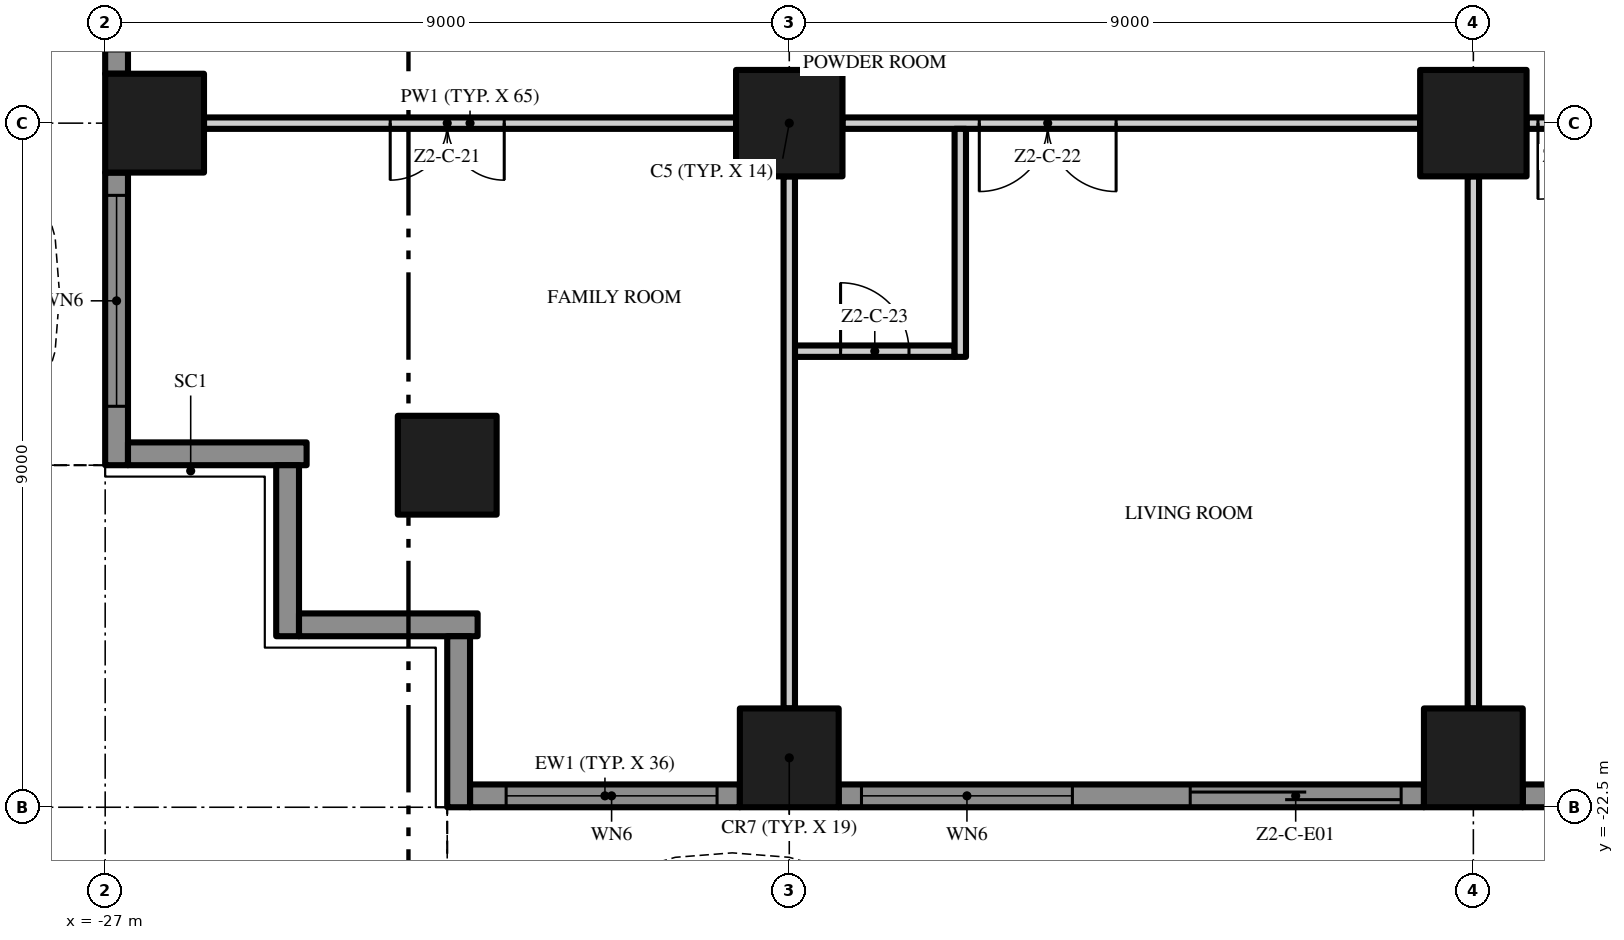
"""IFC4 building model, lengths in metres.
Left out: names, types, materials, properties, quantities, classifications, styles, units other than length and angle.
Written with IfcOpenShell. Run it as: python <this file> out.ifc"""

import sys

from ifc_helpers import new_model, si_unit, direction, frame, frame_2d, origin, origin_2d, place, context, subcontext, project, spatial, polyline, rectangle, outline, extrude, element, fill, save


model = new_model("IFC4")
c1 = context("Model", 3, precision=1e-05, world=origin(), true_north=direction((0.0, 1.0)))
c2 = subcontext(c1, "Body", "Model", "MODEL_VIEW")
j1 = project(units=[si_unit("LENGTHUNIT", "METRE"), si_unit("PLANEANGLEUNIT", "RADIAN")], contexts=[c1])
p1 = place(None, origin())
s1 = spatial("IfcSite", under=j1, at=p1, CompositionType="ELEMENT")
p2 = place(p1, origin())
s2 = spatial("IfcBuilding", under=s1, at=p2, CompositionType="ELEMENT")
p3 = place(p2, frame((0.0, 0.0, 92.2)))
s3 = spatial("IfcBuildingStorey", under=s2, at=p3, CompositionType="ELEMENT", Elevation=92.2)
p4 = place(p3, frame((-18.0, -13.5, 0.0), z_axis=(0.0, 0.0, 1.0), x_axis=(1.0, 0.0, 0.0)))
e1 = element("IfcColumn", 1, at=p4, inside=s3, PredefinedType="COLUMN", context=c2, shape_type="SweptSolid", body=[
    extrude(rectangle(XDim=1.4, YDim=1.4, at=origin_2d()), origin(), (0.0, 0.0, 1.0), 3.5),
])
for number, where, z_axis, x_axis in (
    (2, (-18.0, -21.85, 0.0), (0.0, 0.0, 1.0), (1.0, 0.0, 0.0)),
    (3, (-26.35, -13.5, 0.0), (0.0, 0.0, 1.0), (1.0, 0.0, 0.0)),
    (4, (-22.5, -18.0, 0.0), (0.0, 0.0, 1.0), (1.0, 0.0, 0.0)),
):
    element("IfcColumn", number, at=place(p3, frame(where, z_axis=z_axis, x_axis=x_axis)), inside=s3, PredefinedType="COLUMN", context=c2, shape_type="SweptSolid", body=[
        extrude(rectangle(XDim=1.3, YDim=1.3, at=origin_2d()), origin(), (0.0, 0.0, 1.0), 3.5),
    ])
p5 = place(p3, frame((-9.0, -13.5, 0.0), z_axis=(0.0, 0.0, 1.0), x_axis=(1.0, 0.0, 0.0)))
e5 = element("IfcColumn", 5, at=p5, inside=s3, PredefinedType="COLUMN", context=c2, shape_type="SweptSolid", body=[
    extrude(rectangle(XDim=1.4, YDim=1.4, at=origin_2d()), origin(), (0.0, 0.0, 1.0), 3.5),
])
p6 = place(p3, frame((-9.0, -21.85, 0.0), z_axis=(0.0, 0.0, 1.0), x_axis=(1.0, 0.0, 0.0)))
e6 = element("IfcColumn", 6, at=p6, inside=s3, PredefinedType="COLUMN", context=c2, shape_type="SweptSolid", body=[
    extrude(rectangle(XDim=1.3, YDim=1.3, at=origin_2d()), origin(), (0.0, 0.0, 1.0), 3.5),
])
p7 = place(p3, frame((-18.65, -22.35, 0.0), z_axis=(0.0, 0.0, 1.0), x_axis=(-1.0, 0.0, 0.0)))
e7 = element("IfcWall", 7, at=p7, inside=s3, PredefinedType="SOLIDWALL", context=c2, shape_type="SweptSolid", body=[
    extrude(rectangle(XDim=3.55, YDim=0.3, at=frame_2d((1.775, 0.0))), origin(), (0.0, 0.0, 1.0), 3.5),
])
p8 = place(p7, frame((0.3, 0.0, 0.45)))
e8 = element("IfcOpeningElement", 8, at=p8, cuts=e7, PredefinedType="OPENING", context=c2, shape_type="SweptSolid", body=[
    extrude(rectangle(XDim=2.775, YDim=2.65, at=frame_2d((1.387, 1.325))), frame((0.0, 0.16, 0.0), z_axis=(0.0, -1.0, 0.0), x_axis=(1.0, 0.0, 0.0)), (0.0, 0.0, 1.0), 0.32),
])
p9 = place(p3, frame((-9.65, -22.35, 0.0), z_axis=(0.0, 0.0, 1.0), x_axis=(-1.0, 0.0, 0.0)))
e9 = element("IfcWall", 9, at=p9, inside=s3, PredefinedType="SOLIDWALL", context=c2, shape_type="SweptSolid", body=[
    extrude(rectangle(XDim=7.7, YDim=0.3, at=frame_2d((3.85, 0.0))), origin(), (0.0, 0.0, 1.0), 3.5),
])
p10 = place(p9, frame((4.625, 0.0, 0.45)))
e10 = element("IfcOpeningElement", 10, at=p10, cuts=e9, PredefinedType="OPENING", context=c2, shape_type="SweptSolid", body=[
    extrude(rectangle(XDim=2.775, YDim=2.65, at=frame_2d((1.387, 1.325))), frame((0.0, 0.16, 0.0), z_axis=(0.0, -1.0, 0.0), x_axis=(1.0, 0.0, 0.0)), (0.0, 0.0, 1.0), 0.32),
])
p11 = place(p9, frame((0.3, 0.0, 0.0)))
e11 = element("IfcOpeningElement", 11, at=p11, cuts=e9, PredefinedType="OPENING", context=c2, shape_type="SweptSolid", body=[
    extrude(rectangle(XDim=2.775, YDim=2.4, at=frame_2d((1.387, 1.2))), frame((0.0, 0.16, 0.0), z_axis=(0.0, -1.0, 0.0), x_axis=(1.0, 0.0, 0.0)), (0.0, 0.0, 1.0), 0.32),
])
p12 = place(p3, frame((-0.65, -22.35, 0.0), z_axis=(0.0, 0.0, 1.0), x_axis=(-1.0, 0.0, 0.0)))
e12 = element("IfcWall", 12, at=p12, inside=s3, PredefinedType="SOLIDWALL", context=c2, shape_type="SweptSolid", body=[
    extrude(rectangle(XDim=7.7, YDim=0.3, at=frame_2d((3.85, 0.0))), origin(), (0.0, 0.0, 1.0), 3.5),
])
p13 = place(p12, frame((4.625, 0.0, 0.45)))
e13 = element("IfcOpeningElement", 13, at=p13, cuts=e12, PredefinedType="OPENING", context=c2, shape_type="SweptSolid", body=[
    extrude(rectangle(XDim=2.775, YDim=2.65, at=frame_2d((1.387, 1.325))), frame((0.0, 0.16, 0.0), z_axis=(0.0, -1.0, 0.0), x_axis=(1.0, 0.0, 0.0)), (0.0, 0.0, 1.0), 0.32),
])
p14 = place(p12, frame((0.3, 0.0, 0.45)))
e14 = element("IfcOpeningElement", 14, at=p14, cuts=e12, PredefinedType="OPENING", context=c2, shape_type="SweptSolid", body=[
    extrude(rectangle(XDim=2.775, YDim=2.65, at=frame_2d((1.387, 1.325))), frame((0.0, 0.16, 0.0), z_axis=(0.0, -1.0, 0.0), x_axis=(1.0, 0.0, 0.0)), (0.0, 0.0, 1.0), 0.32),
])
p15 = place(p3, frame((-26.85, -12.85, 0.0), z_axis=(0.0, 0.0, 1.0), x_axis=(0.0, 1.0, 0.0)))
e15 = element("IfcWall", 15, at=p15, inside=s3, PredefinedType="SOLIDWALL", context=c2, shape_type="SweptSolid", body=[
    extrude(rectangle(XDim=7.7, YDim=0.3, at=frame_2d((3.85, 0.0))), origin(), (0.0, 0.0, 1.0), 3.5),
])
p16 = place(p15, frame((4.625, 0.0, 0.0)))
e16 = element("IfcOpeningElement", 16, at=p16, cuts=e15, PredefinedType="OPENING", context=c2, shape_type="SweptSolid", body=[
    extrude(rectangle(XDim=2.775, YDim=2.4, at=frame_2d((1.387, 1.2))), frame((0.0, 0.16, 0.0), z_axis=(0.0, -1.0, 0.0), x_axis=(1.0, 0.0, 0.0)), (0.0, 0.0, 1.0), 0.32),
])
p17 = place(p15, frame((0.3, 0.0, 0.45)))
e17 = element("IfcOpeningElement", 17, at=p17, cuts=e15, PredefinedType="OPENING", context=c2, shape_type="SweptSolid", body=[
    extrude(rectangle(XDim=2.775, YDim=2.65, at=frame_2d((1.387, 1.325))), frame((0.0, 0.16, 0.0), z_axis=(0.0, -1.0, 0.0), x_axis=(1.0, 0.0, 0.0)), (0.0, 0.0, 1.0), 0.32),
])
p18 = place(p3, frame((-26.85, -18.0, 0.0), z_axis=(0.0, 0.0, 1.0), x_axis=(0.0, 1.0, 0.0)))
e18 = element("IfcWall", 18, at=p18, inside=s3, PredefinedType="SOLIDWALL", context=c2, shape_type="SweptSolid", body=[
    extrude(rectangle(XDim=3.85, YDim=0.3, at=frame_2d((1.925, 0.0))), origin(), (0.0, 0.0, 1.0), 3.5),
])
p19 = place(p18, frame((0.775, 0.0, 0.45)))
e19 = element("IfcOpeningElement", 19, at=p19, cuts=e18, PredefinedType="OPENING", context=c2, shape_type="SweptSolid", body=[
    extrude(rectangle(XDim=2.775, YDim=2.65, at=frame_2d((1.387, 1.325))), frame((0.0, 0.16, 0.0), z_axis=(0.0, -1.0, 0.0), x_axis=(1.0, 0.0, 0.0)), (0.0, 0.0, 1.0), 0.32),
])
p20 = place(p3, frame((-24.35, -17.85, 0.0), z_axis=(0.0, 0.0, 1.0), x_axis=(-1.0, 0.0, 0.0)))
e20 = element("IfcWall", 20, at=p20, inside=s3, PredefinedType="SOLIDWALL", context=c2, shape_type="SweptSolid", body=[
    extrude(rectangle(XDim=2.35, YDim=0.3, at=frame_2d((1.175, 0.0))), origin(), (0.0, 0.0, 1.0), 3.5),
])
p21 = place(p3, frame((-24.6, -20.25, 0.0), z_axis=(0.0, 0.0, 1.0), x_axis=(0.0, 1.0, 0.0)))
e21 = element("IfcWall", 21, at=p21, inside=s3, PredefinedType="SOLIDWALL", context=c2, shape_type="SweptSolid", body=[
    extrude(rectangle(XDim=2.25, YDim=0.3, at=frame_2d((1.125, 0.0))), origin(), (0.0, 0.0, 1.0), 3.5),
])
p22 = place(p3, frame((-22.1, -20.1, 0.0), z_axis=(0.0, 0.0, 1.0), x_axis=(-1.0, 0.0, 0.0)))
e22 = element("IfcWall", 22, at=p22, inside=s3, PredefinedType="SOLIDWALL", context=c2, shape_type="SweptSolid", body=[
    extrude(rectangle(XDim=2.35, YDim=0.3, at=frame_2d((1.175, 0.0))), origin(), (0.0, 0.0, 1.0), 3.5),
])
p23 = place(p3, frame((-22.35, -22.5, 0.0), z_axis=(0.0, 0.0, 1.0), x_axis=(0.0, 1.0, 0.0)))
e23 = element("IfcWall", 23, at=p23, inside=s3, PredefinedType="SOLIDWALL", context=c2, shape_type="SweptSolid", body=[
    extrude(rectangle(XDim=2.25, YDim=0.3, at=frame_2d((1.125, 0.0))), origin(), (0.0, 0.0, 1.0), 3.5),
])
p24 = place(p3, origin())
e24 = element("IfcWall", 24, at=p24, inside=s3, PredefinedType="USERDEFINED", context=c2, shape_type="SweptSolid", body=[
    extrude(outline(polyline([(-22.5, -24.3), (-21.0, -23.595), (-19.5, -23.159), (-18.75, -23.1), (-18.0, -23.159), (-16.5, -23.595), (-15.0, -24.3), (-13.5, -25.005), (-12.0, -25.441), (-11.25, -25.5), (-10.5, -25.441), (-9.0, -25.005), (-7.5, -24.3), (-6.0, -23.595), (-4.5, -23.159), (-3.75, -23.1), (-3.0, -23.159), (-1.5, -23.595), (0.0, -24.3), (1.5, -25.005), (3.0, -25.441), (3.75, -25.5), (4.5, -25.441), (6.0, -25.005), (7.5, -24.3), (9.0, -23.595), (10.5, -23.159), (11.25, -23.1), (12.0, -23.159), (13.5, -23.595), (15.0, -24.3), (16.5, -25.005), (18.0, -25.441), (18.75, -25.5), (19.5, -25.441), (21.0, -25.005), (22.5, -24.3), (22.394, -24.074), (20.911, -24.771), (19.455, -25.194), (18.75, -25.249), (18.045, -25.194), (16.589, -24.771), (15.106, -24.074), (13.589, -23.36), (12.045, -22.911), (11.25, -22.849), (10.455, -22.911), (8.911, -23.36), (7.394, -24.074), (5.911, -24.771), (4.455, -25.194), (3.75, -25.249), (3.045, -25.194), (1.589, -24.771), (0.106, -24.074), (-1.411, -23.36), (-2.955, -22.911), (-3.75, -22.849), (-4.545, -22.911), (-6.089, -23.36), (-7.606, -24.074), (-9.089, -24.771), (-10.545, -25.194), (-11.25, -25.249), (-11.955, -25.194), (-13.411, -24.771), (-14.894, -24.074), (-16.411, -23.36), (-17.955, -22.911), (-18.75, -22.849), (-19.545, -22.911), (-21.089, -23.36), (-22.606, -24.074), (-22.5, -24.3)])), origin(), (0.0, 0.0, 1.0), 0.9),
])
p25 = place(p3, origin())
e25 = element("IfcWall", 25, at=p25, inside=s3, PredefinedType="USERDEFINED", context=c2, shape_type="SweptSolid", body=[
    extrude(outline(polyline([(-28.8, 18.0), (-28.095, 16.5), (-27.659, 15.0), (-27.6, 14.25), (-27.659, 13.5), (-28.095, 12.0), (-28.8, 10.5), (-29.505, 9.0), (-29.941, 7.5), (-30.0, 6.75), (-29.941, 6.0), (-29.505, 4.5), (-28.8, 3.0), (-28.095, 1.5), (-27.659, 0.0), (-27.6, -0.75), (-27.659, -1.5), (-28.095, -3.0), (-28.8, -4.5), (-29.505, -6.0), (-29.941, -7.5), (-30.0, -8.25), (-29.941, -9.0), (-29.505, -10.5), (-28.8, -12.0), (-28.095, -13.5), (-27.659, -15.0), (-27.6, -15.75), (-27.659, -16.5), (-28.095, -18.0), (-27.855, -18.07), (-27.411, -16.545), (-27.349, -15.75), (-27.411, -14.955), (-27.86, -13.411), (-28.574, -11.894), (-29.271, -10.411), (-29.694, -8.955), (-29.749, -8.25), (-29.694, -7.545), (-29.271, -6.089), (-28.574, -4.606), (-27.86, -3.089), (-27.411, -1.545), (-27.349, -0.75), (-27.411, 0.045), (-27.86, 1.589), (-28.574, 3.106), (-29.271, 4.589), (-29.694, 6.045), (-29.749, 6.75), (-29.694, 7.455), (-29.271, 8.911), (-28.574, 10.394), (-27.86, 11.911), (-27.411, 13.455), (-27.349, 14.25), (-27.411, 15.045), (-27.86, 16.589), (-28.574, 18.106), (-28.8, 18.0)])), origin(), (0.0, 0.0, 1.0), 0.9),
])
p26 = place(p3, frame((-17.925, -16.5, 0.0), z_axis=(0.0, 0.0, 1.0), x_axis=(1.0, 0.0, 0.0)))
e26 = element("IfcWall", 26, at=p26, inside=s3, PredefinedType="PARTITIONING", context=c2, shape_type="SweptSolid", body=[
    extrude(rectangle(XDim=2.1, YDim=0.15, at=frame_2d((1.05, 0.0))), origin(), (0.0, 0.0, 1.0), 3.5),
])
p27 = place(p26, frame((0.6, 0.0, 0.0)))
e27 = element("IfcOpeningElement", 27, at=p27, cuts=e26, PredefinedType="OPENING", context=c2, shape_type="SweptSolid", body=[
    extrude(rectangle(XDim=0.9, YDim=2.1, at=frame_2d((0.45, 1.05))), frame((0.0, 0.085, 0.0), z_axis=(0.0, -1.0, 0.0), x_axis=(1.0, 0.0, 0.0)), (0.0, 0.0, 1.0), 0.17),
])
p28 = place(p3, frame((-18.7, -13.5, 0.0), z_axis=(0.0, 0.0, 1.0), x_axis=(-1.0, 0.0, 0.0)))
e28 = element("IfcWall", 28, at=p28, inside=s3, PredefinedType="PARTITIONING", context=c2, shape_type="SweptSolid", body=[
    extrude(rectangle(XDim=7.0, YDim=0.15, at=frame_2d((3.5, 0.0))), origin(), (0.0, 0.0, 1.0), 3.5),
])
p29 = place(p28, frame((3.05, 0.0, 0.0)))
e29 = element("IfcOpeningElement", 29, at=p29, cuts=e28, PredefinedType="OPENING", context=c2, shape_type="SweptSolid", body=[
    extrude(rectangle(XDim=1.5, YDim=2.4, at=frame_2d((0.75, 1.2))), frame((0.0, 0.085, 0.0), z_axis=(0.0, -1.0, 0.0), x_axis=(1.0, 0.0, 0.0)), (0.0, 0.0, 1.0), 0.17),
])
p30 = place(p3, frame((-9.7, -13.5, 0.0), z_axis=(0.0, 0.0, 1.0), x_axis=(-1.0, 0.0, 0.0)))
e30 = element("IfcWall", 30, at=p30, inside=s3, PredefinedType="PARTITIONING", context=c2, shape_type="SweptSolid", body=[
    extrude(rectangle(XDim=7.6, YDim=0.15, at=frame_2d((3.8, 0.0))), origin(), (0.0, 0.0, 1.0), 3.5),
])
p31 = place(p30, frame((4.0, 0.0, 0.0)))
e31 = element("IfcOpeningElement", 31, at=p31, cuts=e30, PredefinedType="OPENING", context=c2, shape_type="SweptSolid", body=[
    extrude(rectangle(XDim=1.8, YDim=2.4, at=frame_2d((0.9, 1.2))), frame((0.0, 0.085, 0.0), z_axis=(0.0, -1.0, 0.0), x_axis=(1.0, 0.0, 0.0)), (0.0, 0.0, 1.0), 0.17),
])
p32 = place(p3, frame((-0.7, -13.5, 0.0), z_axis=(0.0, 0.0, 1.0), x_axis=(-1.0, 0.0, 0.0)))
e32 = element("IfcWall", 32, at=p32, inside=s3, PredefinedType="PARTITIONING", context=c2, shape_type="SweptSolid", body=[
    extrude(rectangle(XDim=7.6, YDim=0.15, at=frame_2d((3.8, 0.0))), origin(), (0.0, 0.0, 1.0), 3.5),
])
p33 = place(p32, frame((6.45, 0.0, 0.0)))
e33 = element("IfcOpeningElement", 33, at=p33, cuts=e32, PredefinedType="OPENING", context=c2, shape_type="SweptSolid", body=[
    extrude(rectangle(XDim=1.0, YDim=2.4, at=frame_2d((0.5, 1.2))), frame((0.0, 0.085, 0.0), z_axis=(0.0, -1.0, 0.0), x_axis=(1.0, 0.0, 0.0)), (0.0, 0.0, 1.0), 0.17),
])
p34 = place(p32, frame((0.15, 0.0, 0.0)))
e34 = element("IfcOpeningElement", 34, at=p34, cuts=e32, PredefinedType="OPENING", context=c2, shape_type="SweptSolid", body=[
    extrude(rectangle(XDim=1.0, YDim=2.4, at=frame_2d((0.5, 1.2))), frame((0.0, 0.085, 0.0), z_axis=(0.0, -1.0, 0.0), x_axis=(1.0, 0.0, 0.0)), (0.0, 0.0, 1.0), 0.17),
])
p35 = place(p3, frame((-18.0, -21.2, 0.0), z_axis=(0.0, 0.0, 1.0), x_axis=(0.0, 1.0, 0.0)))
e35 = element("IfcWall", 35, at=p35, inside=s3, PredefinedType="PARTITIONING", context=c2, shape_type="SweptSolid", body=[
    extrude(rectangle(XDim=7.0, YDim=0.15, at=frame_2d((3.5, 0.0))), origin(), (0.0, 0.0, 1.0), 3.5),
])
p36 = place(p3, frame((-15.75, -16.575, 0.0), z_axis=(0.0, 0.0, 1.0), x_axis=(0.0, 1.0, 0.0)))
e36 = element("IfcWall", 36, at=p36, inside=s3, PredefinedType="PARTITIONING", context=c2, shape_type="SweptSolid", body=[
    extrude(rectangle(XDim=3.0, YDim=0.15, at=frame_2d((1.5, 0.0))), origin(), (0.0, 0.0, 1.0), 3.5),
])
p37 = place(p3, frame((-9.0, -21.2, 0.0), z_axis=(0.0, 0.0, 1.0), x_axis=(0.0, 1.0, 0.0)))
e37 = element("IfcWall", 37, at=p37, inside=s3, PredefinedType="PARTITIONING", context=c2, shape_type="SweptSolid", body=[
    extrude(rectangle(XDim=7.0, YDim=0.15, at=frame_2d((3.5, 0.0))), origin(), (0.0, 0.0, 1.0), 3.5),
])
p38 = place(p8, origin())
e38 = element("IfcWindow", 38, at=p38, inside=s3, PartitioningType="SINGLE_PANEL", PredefinedType="WINDOW", context=c2, shape_type="SweptSolid", body=[
    extrude(rectangle(XDim=2.775, YDim=2.65, at=frame_2d((1.387, 1.325))), frame((0.0, 0.03, 0.0), z_axis=(0.0, -1.0, 0.0), x_axis=(1.0, 0.0, 0.0)), (0.0, 0.0, 1.0), 0.06),
])
fill(e8, e38)
p39 = place(p10, origin())
e39 = element("IfcWindow", 39, at=p39, inside=s3, PartitioningType="SINGLE_PANEL", PredefinedType="WINDOW", context=c2, shape_type="SweptSolid", body=[
    extrude(rectangle(XDim=2.775, YDim=2.65, at=frame_2d((1.387, 1.325))), frame((0.0, 0.03, 0.0), z_axis=(0.0, -1.0, 0.0), x_axis=(1.0, 0.0, 0.0)), (0.0, 0.0, 1.0), 0.06),
])
fill(e10, e39)
p40 = place(p11, origin())
e40 = element("IfcDoor", 40, at=p40, inside=s3, OperationType="SINGLE_SWING_LEFT", PredefinedType="DOOR", context=c2, shape_type="SweptSolid", body=[
    extrude(rectangle(XDim=2.775, YDim=2.4, at=frame_2d((1.387, 1.2))), frame((0.0, 0.025, 0.0), z_axis=(0.0, -1.0, 0.0), x_axis=(1.0, 0.0, 0.0)), (0.0, 0.0, 1.0), 0.05),
])
fill(e11, e40)
p41 = place(p19, origin())
e41 = element("IfcWindow", 41, at=p41, inside=s3, PartitioningType="SINGLE_PANEL", PredefinedType="WINDOW", context=c2, shape_type="SweptSolid", body=[
    extrude(rectangle(XDim=2.775, YDim=2.65, at=frame_2d((1.387, 1.325))), frame((0.0, 0.03, 0.0), z_axis=(0.0, -1.0, 0.0), x_axis=(1.0, 0.0, 0.0)), (0.0, 0.0, 1.0), 0.06),
])
fill(e19, e41)
p42 = place(p29, origin())
e42 = element("IfcDoor", 42, at=p42, inside=s3, OperationType="DOUBLE_DOOR_SINGLE_SWING", PredefinedType="DOOR", context=c2, shape_type="SweptSolid", body=[
    extrude(rectangle(XDim=1.5, YDim=2.4, at=frame_2d((0.75, 1.2))), frame((0.0, 0.025, 0.0), z_axis=(0.0, -1.0, 0.0), x_axis=(1.0, 0.0, 0.0)), (0.0, 0.0, 1.0), 0.05),
])
fill(e29, e42)
p43 = place(p31, origin())
e43 = element("IfcDoor", 43, at=p43, inside=s3, OperationType="DOUBLE_DOOR_SINGLE_SWING", PredefinedType="DOOR", context=c2, shape_type="SweptSolid", body=[
    extrude(rectangle(XDim=1.8, YDim=2.4, at=frame_2d((0.9, 1.2))), frame((0.0, 0.025, 0.0), z_axis=(0.0, -1.0, 0.0), x_axis=(1.0, 0.0, 0.0)), (0.0, 0.0, 1.0), 0.05),
])
fill(e31, e43)
p44 = place(p27, origin())
e44 = element("IfcDoor", 44, at=p44, inside=s3, OperationType="SINGLE_SWING_LEFT", PredefinedType="DOOR", context=c2, shape_type="SweptSolid", body=[
    extrude(rectangle(XDim=0.9, YDim=2.1, at=frame_2d((0.45, 1.05))), frame((0.0, 0.025, 0.0), z_axis=(0.0, -1.0, 0.0), x_axis=(1.0, 0.0, 0.0)), (0.0, 0.0, 1.0), 0.05),
])
fill(e27, e44)
p45 = place(p33, origin())
e45 = element("IfcDoor", 45, at=p45, inside=s3, OperationType="SINGLE_SWING_RIGHT", PredefinedType="DOOR", context=c2, shape_type="SweptSolid", body=[
    extrude(rectangle(XDim=1.0, YDim=2.4, at=frame_2d((0.5, 1.2))), frame((0.0, 0.025, 0.0), z_axis=(0.0, -1.0, 0.0), x_axis=(1.0, 0.0, 0.0)), (0.0, 0.0, 1.0), 0.05),
])
fill(e33, e45)
save(model, sys.argv[1])
